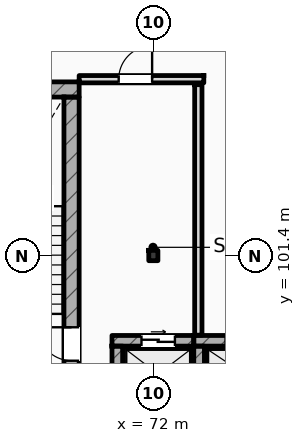
"""IFC4 building model, lengths in metres.
Left out: names, types, materials, properties, quantities, classifications, styles, units other than length and angle.
Written with IfcOpenShell. Run it as: python <this file> out.ifc"""

import sys

from ifc_helpers import new_model, si_unit, direction, frame, frame_2d, origin, origin_2d, place, context, subcontext, project, spatial, rectangle, i_section, extrude, element, fill, save


model = new_model("IFC4")
c1 = context("Model", 3, precision=1e-05, world=origin(), true_north=direction((0.0, 1.0)))
c2 = subcontext(c1, "Body", "Model", "MODEL_VIEW")
j1 = project(units=[si_unit("LENGTHUNIT", "METRE"), si_unit("PLANEANGLEUNIT", "RADIAN")], contexts=[c1])
p1 = place(None, origin())
s1 = spatial("IfcSite", under=j1, at=p1, CompositionType="ELEMENT")
p2 = place(p1, origin())
s2 = spatial("IfcBuilding", under=s1, at=p2, CompositionType="ELEMENT")
p3 = place(p2, frame((0.0, 0.0, 42.6)))
s3 = spatial("IfcBuildingStorey", under=s2, at=p3, CompositionType="ELEMENT", Elevation=42.6)
p4 = place(p3, frame((72.0, 101.4, 0.0), z_axis=(0.0, 0.0, 1.0), x_axis=(1.0, 0.0, 0.0)))
e1 = element("IfcColumn", 1, at=p4, inside=s3, PredefinedType="COLUMN", context=c2, shape_type="SweptSolid", body=[
    extrude(i_section(OverallWidth=0.3, OverallDepth=0.34, WebThickness=0.012, FlangeThickness=0.021, FilletRadius=0.027, at=origin_2d()), origin(), (0.0, 0.0, 1.0), 4.2),
])
p5 = place(p3, frame((64.4, 106.862, 0.0), z_axis=(0.0, 0.0, 1.0), x_axis=(1.0, 0.0, 0.0)))
e2 = element("IfcWall", 2, at=p5, inside=s3, PredefinedType="SHEAR", context=c2, shape_type="SweptSolid", body=[
    extrude(rectangle(XDim=5.16, YDim=0.5, at=frame_2d((2.58, 0.0))), origin(), (0.0, 0.0, 1.0), 4.2),
])
p6 = place(p3, frame((69.31, 97.5, 0.0), z_axis=(0.0, 0.0, 1.0), x_axis=(0.0, 1.0, 0.0)))
e3 = element("IfcWall", 3, at=p6, inside=s3, PredefinedType="SHEAR", context=c2, shape_type="SweptSolid", body=[
    extrude(rectangle(XDim=9.112, YDim=0.5, at=frame_2d((4.556, 0.0))), origin(), (0.0, 0.0, 1.0), 4.2),
])
p7 = place(p6, frame((0.44, 0.0, 0.0)))
e4 = element("IfcOpeningElement", 4, at=p7, cuts=e3, PredefinedType="OPENING", context=c2, shape_type="SweptSolid", body=[
    extrude(rectangle(XDim=1.1, YDim=2.2, at=frame_2d((0.55, 1.1))), frame((0.0, 0.26, 0.0), z_axis=(0.0, -1.0, 0.0), x_axis=(1.0, 0.0, 0.0)), (0.0, 0.0, 1.0), 0.52),
])
p8 = place(p3, frame((70.64, 98.595, 0.0), z_axis=(0.0, 0.0, 1.0), x_axis=(1.0, 0.0, 0.0)))
e5 = element("IfcWall", 5, at=p8, inside=s3, PredefinedType="SHEAR", context=c2, shape_type="SweptSolid", body=[
    extrude(rectangle(XDim=2.69, YDim=0.35, at=frame_2d((1.345, 0.0))), origin(), (0.0, 0.0, 1.0), 3.94),
])
p9 = place(p8, frame((0.97, 0.0, 0.0)))
e6 = element("IfcOpeningElement", 6, at=p9, cuts=e5, PredefinedType="OPENING", context=c2, shape_type="SweptSolid", body=[
    extrude(rectangle(XDim=1.1, YDim=2.2, at=frame_2d((0.55, 1.1))), frame((0.0, 0.185, 0.0), z_axis=(0.0, -1.0, 0.0), x_axis=(1.0, 0.0, 0.0)), (0.0, 0.0, 1.0), 0.37),
])
p10 = place(p3, frame((70.815, 96.58, 0.0), z_axis=(0.0, 0.0, 1.0), x_axis=(0.0, 1.0, 0.0)))
e7 = element("IfcWall", 7, at=p10, inside=s3, PredefinedType="SHEAR", context=c2, shape_type="SweptSolid", body=[
    extrude(rectangle(XDim=1.84, YDim=0.35, at=frame_2d((0.92, 0.0))), origin(), (0.0, 0.0, 1.0), 3.94),
])
p11 = place(p3, frame((73.33, 98.595, 0.0), z_axis=(0.0, 0.0, 1.0), x_axis=(1.0, 0.0, 0.0)))
e8 = element("IfcWall", 8, at=p11, inside=s3, PredefinedType="SHEAR", context=c2, shape_type="SweptSolid", body=[
    extrude(rectangle(XDim=3.34, YDim=0.35, at=frame_2d((1.67, 0.0))), origin(), (0.0, 0.0, 1.0), 3.94),
])
p12 = place(p11, frame((1.045, 0.0, 0.0)))
e9 = element("IfcOpeningElement", 9, at=p12, cuts=e8, PredefinedType="OPENING", context=c2, shape_type="SweptSolid", body=[
    extrude(rectangle(XDim=1.25, YDim=2.25, at=frame_2d((0.625, 1.125))), frame((0.0, 0.185, 0.0), z_axis=(0.0, -1.0, 0.0), x_axis=(1.0, 0.0, 0.0)), (0.0, 0.0, 1.0), 0.37),
])
p13 = place(p3, frame((73.505, 96.58, 0.0), z_axis=(0.0, 0.0, 1.0), x_axis=(0.0, 1.0, 0.0)))
e10 = element("IfcWall", 10, at=p13, inside=s3, PredefinedType="SHEAR", context=c2, shape_type="SweptSolid", body=[
    extrude(rectangle(XDim=1.84, YDim=0.35, at=frame_2d((0.92, 0.0))), origin(), (0.0, 0.0, 1.0), 3.94),
])
p14 = place(p3, frame((73.48, 98.78, 0.0), z_axis=(0.0, 0.0, 1.0), x_axis=(0.0, 1.0, 0.0)))
e11 = element("IfcWall", 11, at=p14, inside=s3, PredefinedType="STANDARD", context=c2, shape_type="SweptSolid", body=[
    extrude(rectangle(XDim=8.24, YDim=0.24, at=frame_2d((4.12, 0.0))), origin(), (0.0, 0.0, 1.0), 3.94),
])
p15 = place(p3, frame((69.56, 107.2, 0.0), z_axis=(0.0, 0.0, 1.0), x_axis=(1.0, 0.0, 0.0)))
e12 = element("IfcWall", 12, at=p15, inside=s3, PredefinedType="STANDARD", context=c2, shape_type="SweptSolid", body=[
    extrude(rectangle(XDim=4.1, YDim=0.24, at=frame_2d((2.05, 0.0))), origin(), (0.0, 0.0, 1.0), 3.94),
])
p16 = place(p15, frame((1.3, 0.0, 0.0)))
e13 = element("IfcOpeningElement", 13, at=p16, cuts=e12, PredefinedType="OPENING", context=c2, shape_type="SweptSolid", body=[
    extrude(rectangle(XDim=1.1, YDim=2.2, at=frame_2d((0.55, 1.1))), frame((0.0, 0.13, 0.0), z_axis=(0.0, -1.0, 0.0), x_axis=(1.0, 0.0, 0.0)), (0.0, 0.0, 1.0), 0.26),
])
p17 = place(p7, origin())
e14 = element("IfcDoor", 14, at=p17, inside=s3, OperationType="SINGLE_SWING_RIGHT", PredefinedType="DOOR", context=c2, shape_type="SweptSolid", body=[
    extrude(rectangle(XDim=1.1, YDim=2.2, at=frame_2d((0.55, 1.1))), frame((0.0, 0.025, 0.0), z_axis=(0.0, -1.0, 0.0), x_axis=(1.0, 0.0, 0.0)), (0.0, 0.0, 1.0), 0.05),
])
fill(e4, e14)
p18 = place(p9, origin())
e15 = element("IfcDoor", 15, at=p18, inside=s3, OperationType="SLIDING_TO_LEFT", PredefinedType="DOOR", context=c2, shape_type="SweptSolid", body=[
    extrude(rectangle(XDim=1.1, YDim=2.2, at=frame_2d((0.55, 1.1))), frame((0.0, 0.025, 0.0), z_axis=(0.0, -1.0, 0.0), x_axis=(1.0, 0.0, 0.0)), (0.0, 0.0, 1.0), 0.05),
])
fill(e6, e15)
p19 = place(p16, origin())
e16 = element("IfcDoor", 16, at=p19, inside=s3, OperationType="SINGLE_SWING_RIGHT", PredefinedType="DOOR", context=c2, shape_type="SweptSolid", body=[
    extrude(rectangle(XDim=1.1, YDim=2.2, at=frame_2d((0.55, 1.1))), frame((0.0, 0.025, 0.0), z_axis=(0.0, -1.0, 0.0), x_axis=(1.0, 0.0, 0.0)), (0.0, 0.0, 1.0), 0.05),
])
fill(e13, e16)
save(model, sys.argv[1])
